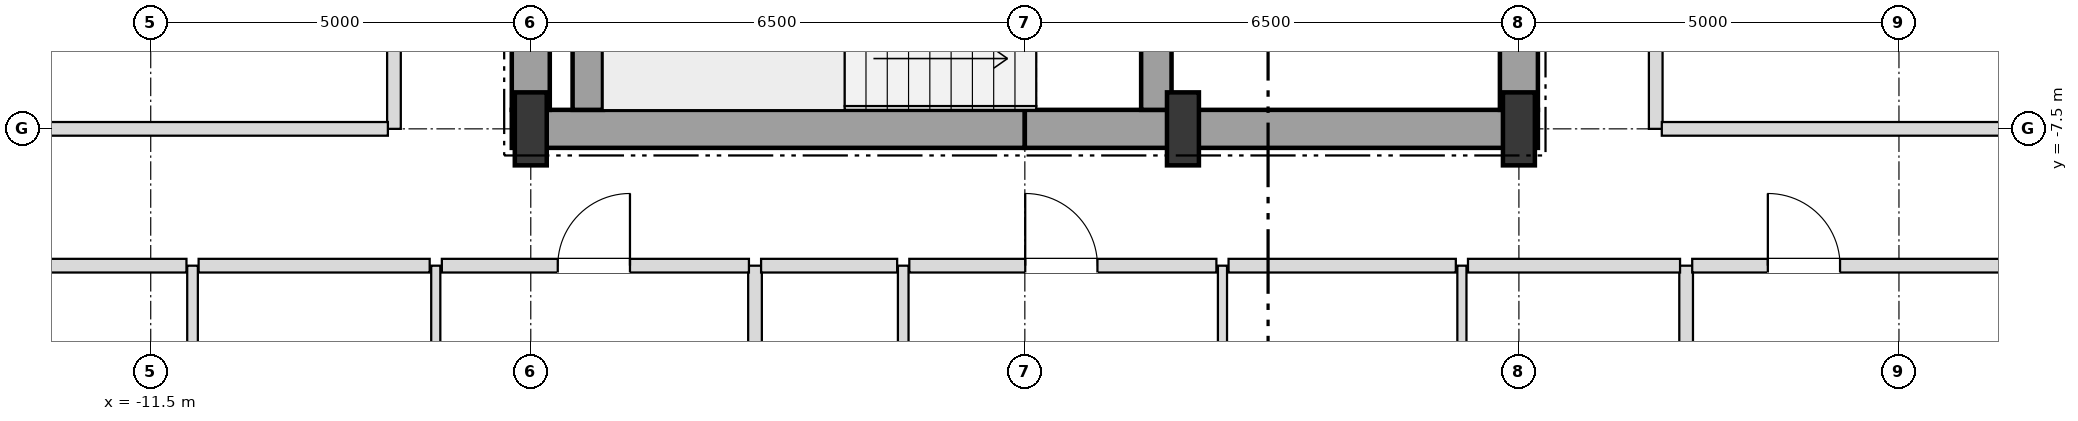
"""IFC4 building model, lengths in metres.
Left out: names, types, materials, properties, quantities, classifications, styles, units other than length and angle.
Written with IfcOpenShell. Run it as: python <this file> out.ifc"""

import sys

from ifc_helpers import new_model, si_unit, direction, frame, frame_2d, origin, origin_2d, place, context, subcontext, project, spatial, rectangle, i_section, extrude, element, fill, save


model = new_model("IFC4")
c1 = context("Model", 3, precision=1e-05, world=origin(), true_north=direction((0.0, 1.0)))
c2 = subcontext(c1, "Body", "Model", "MODEL_VIEW")
j1 = project(units=[si_unit("LENGTHUNIT", "METRE"), si_unit("PLANEANGLEUNIT", "RADIAN")], contexts=[c1])
p1 = place(None, origin())
s1 = spatial("IfcSite", under=j1, at=p1, CompositionType="ELEMENT")
p2 = place(p1, origin())
s2 = spatial("IfcBuilding", under=s1, at=p2, CompositionType="ELEMENT")
p3 = place(p2, frame((0.0, 0.0, 39.6)))
s3 = spatial("IfcBuildingStorey", under=s2, at=p3, CompositionType="ELEMENT", Elevation=39.6)
for number, where, z_axis, x_axis in (
    (1, (-6.5, -7.5, 0.0), (0.0, 0.0, 1.0), (1.0, 0.0, 0.0)),
    (2, (2.08, -7.5, 0.0), (0.0, 0.0, 1.0), (1.0, 0.0, 0.0)),
    (3, (6.5, -7.5, 0.0), (0.0, 0.0, 1.0), (1.0, 0.0, 0.0)),
):
    element("IfcColumn", number, at=place(p3, frame(where, z_axis=z_axis, x_axis=x_axis)), inside=s3, PredefinedType="COLUMN", context=c2, shape_type="SweptSolid", body=[
        extrude(i_section(OverallWidth=0.42, OverallDepth=0.96, WebThickness=0.022, FlangeThickness=0.034, at=origin_2d()), origin(), (0.0, 0.0, 1.0), 3.6),
    ])
for number, where, z_axis, x_axis in (
    (4, (-6.75, -7.5, 0.0), (0.0, 0.0, 1.0), (1.0, 0.0, 0.0)),
    (5, (0.0, -7.5, 0.0), (0.0, 0.0, 1.0), (1.0, 0.0, 0.0)),
):
    element("IfcWall", number, at=place(p3, frame(where, z_axis=z_axis, x_axis=x_axis)), inside=s3, PredefinedType="SHEAR", context=c2, shape_type="SweptSolid", body=[
        extrude(rectangle(XDim=6.75, YDim=0.5, at=frame_2d((3.375, 0.0))), origin(), (0.0, 0.0, 1.0), 3.38),
    ])
p4 = place(p3, frame((-6.5, -7.25, 0.0), z_axis=(0.0, 0.0, 1.0), x_axis=(0.0, 1.0, 0.0)))
e6 = element("IfcWall", 6, at=p4, inside=s3, PredefinedType="SHEAR", context=c2, shape_type="SweptSolid", body=[
    extrude(rectangle(XDim=3.55, YDim=0.5, at=frame_2d((1.775, 0.0))), origin(), (0.0, 0.0, 1.0), 3.38),
])
p5 = place(p3, frame((6.5, -7.25, 0.0), z_axis=(0.0, 0.0, 1.0), x_axis=(0.0, 1.0, 0.0)))
e7 = element("IfcWall", 7, at=p5, inside=s3, PredefinedType="SHEAR", context=c2, shape_type="SweptSolid", body=[
    extrude(rectangle(XDim=5.75, YDim=0.5, at=frame_2d((2.875, 0.0))), origin(), (0.0, 0.0, 1.0), 3.38),
])
p6 = place(p5, frame((0.85, 0.0, 0.0)))
e8 = element("IfcOpeningElement", 8, at=p6, cuts=e7, PredefinedType="OPENING", context=c2, shape_type="SweptSolid", body=[
    extrude(rectangle(XDim=1.05, YDim=2.15, at=frame_2d((0.525, 1.075))), frame((0.0, 0.26, 0.0), z_axis=(0.0, -1.0, 0.0), x_axis=(1.0, 0.0, 0.0)), (0.0, 0.0, 1.0), 0.52),
])
p7 = place(p3, frame((-5.75, -7.25, 0.0), z_axis=(0.0, 0.0, 1.0), x_axis=(0.0, 1.0, 0.0)))
e9 = element("IfcWall", 9, at=p7, inside=s3, PredefinedType="SHEAR", context=c2, shape_type="SweptSolid", body=[
    extrude(rectangle(XDim=2.9, YDim=0.4, at=frame_2d((1.45, 0.0))), origin(), (0.0, 0.0, 1.0), 3.38),
])
p8 = place(p3, frame((1.73, -7.25, 0.0), z_axis=(0.0, 0.0, 1.0), x_axis=(0.0, 1.0, 0.0)))
e10 = element("IfcWall", 10, at=p8, inside=s3, PredefinedType="SHEAR", context=c2, shape_type="SweptSolid", body=[
    extrude(rectangle(XDim=3.3, YDim=0.4, at=frame_2d((1.65, 0.0))), origin(), (0.0, 0.0, 1.0), 3.38),
])
p9 = place(p8, frame((0.9, 0.0, 0.0)))
e11 = element("IfcOpeningElement", 11, at=p9, cuts=e10, PredefinedType="OPENING", context=c2, shape_type="SweptSolid", body=[
    extrude(rectangle(XDim=1.05, YDim=2.15, at=frame_2d((0.525, 1.075))), frame((0.0, 0.21, 0.0), z_axis=(0.0, -1.0, 0.0), x_axis=(1.0, 0.0, 0.0)), (0.0, 0.0, 1.0), 0.42),
])
p10 = place(p3, frame((-10.95, -18.9, 0.0), z_axis=(0.0, 0.0, 1.0), x_axis=(0.0, 1.0, 0.0)))
e12 = element("IfcWall", 12, at=p10, inside=s3, PredefinedType="PARTITIONING", context=c2, shape_type="SweptSolid", body=[
    extrude(rectangle(XDim=9.6, YDim=0.14, at=frame_2d((4.8, 0.0))), origin(), (0.0, 0.0, 1.0), 2.816),
])
p11 = place(p10, frame((4.35, 0.0, 0.0)))
e13 = element("IfcOpeningElement", 13, at=p11, cuts=e12, PredefinedType="OPENING", context=c2, shape_type="SweptSolid", body=[
    extrude(rectangle(XDim=0.9, YDim=2.1, at=frame_2d((0.45, 1.05))), frame((0.0, 0.08, 0.0), z_axis=(0.0, -1.0, 0.0), x_axis=(1.0, 0.0, 0.0)), (0.0, 0.0, 1.0), 0.16),
])
p12 = place(p3, frame((-8.3, -7.5, 0.0), z_axis=(0.0, 0.0, 1.0), x_axis=(0.0, 1.0, 0.0)))
e14 = element("IfcWall", 14, at=p12, inside=s3, PredefinedType="PARTITIONING", context=c2, shape_type="SweptSolid", body=[
    extrude(rectangle(XDim=15.0, YDim=0.18, at=frame_2d((7.5, 0.0))), origin(), (0.0, 0.0, 1.0), 3.38),
])
p13 = place(p12, frame((3.475, 0.0, 0.0)))
e15 = element("IfcOpeningElement", 15, at=p13, cuts=e14, PredefinedType="OPENING", context=c2, shape_type="SweptSolid", body=[
    extrude(rectangle(XDim=0.95, YDim=2.15, at=frame_2d((0.475, 1.075))), frame((0.0, 0.1, 0.0), z_axis=(0.0, -1.0, 0.0), x_axis=(1.0, 0.0, 0.0)), (0.0, 0.0, 1.0), 0.2),
])
p14 = place(p3, frame((-7.75, -18.9, 0.0), z_axis=(0.0, 0.0, 1.0), x_axis=(0.0, 1.0, 0.0)))
e16 = element("IfcWall", 16, at=p14, inside=s3, PredefinedType="PARTITIONING", context=c2, shape_type="SweptSolid", body=[
    extrude(rectangle(XDim=9.6, YDim=0.12, at=frame_2d((4.8, 0.0))), origin(), (0.0, 0.0, 1.0), 2.816),
])
p15 = place(p14, frame((4.325, 0.0, 0.0)))
e17 = element("IfcOpeningElement", 17, at=p15, cuts=e16, PredefinedType="OPENING", context=c2, shape_type="SweptSolid", body=[
    extrude(rectangle(XDim=0.95, YDim=2.1, at=frame_2d((0.475, 1.05))), frame((0.0, 0.07, 0.0), z_axis=(0.0, -1.0, 0.0), x_axis=(1.0, 0.0, 0.0)), (0.0, 0.0, 1.0), 0.14),
])
p16 = place(p3, frame((-3.55, -24.9, 0.0), z_axis=(0.0, 0.0, 1.0), x_axis=(0.0, 1.0, 0.0)))
e18 = element("IfcWall", 18, at=p16, inside=s3, PredefinedType="PARTITIONING", context=c2, shape_type="SweptSolid", body=[
    extrude(rectangle(XDim=15.6, YDim=0.18, at=frame_2d((7.8, 0.0))), origin(), (0.0, 0.0, 1.0), 2.816),
])
p17 = place(p3, frame((-1.6, -18.9, 0.0), z_axis=(0.0, 0.0, 1.0), x_axis=(0.0, 1.0, 0.0)))
e19 = element("IfcWall", 19, at=p17, inside=s3, PredefinedType="PARTITIONING", context=c2, shape_type="SweptSolid", body=[
    extrude(rectangle(XDim=9.6, YDim=0.14, at=frame_2d((4.8, 0.0))), origin(), (0.0, 0.0, 1.0), 2.948),
])
p18 = place(p17, frame((4.35, 0.0, 0.0)))
e20 = element("IfcOpeningElement", 20, at=p18, cuts=e19, PredefinedType="OPENING", context=c2, shape_type="SweptSolid", body=[
    extrude(rectangle(XDim=0.9, YDim=2.1, at=frame_2d((0.45, 1.05))), frame((0.0, 0.08, 0.0), z_axis=(0.0, -1.0, 0.0), x_axis=(1.0, 0.0, 0.0)), (0.0, 0.0, 1.0), 0.16),
])
p19 = place(p3, frame((2.6, -24.9, 0.0), z_axis=(0.0, 0.0, 1.0), x_axis=(0.0, 1.0, 0.0)))
e21 = element("IfcWall", 21, at=p19, inside=s3, PredefinedType="PARTITIONING", context=c2, shape_type="SweptSolid", body=[
    extrude(rectangle(XDim=15.6, YDim=0.12, at=frame_2d((7.8, 0.0))), origin(), (0.0, 0.0, 1.0), 2.816),
])
p20 = place(p19, frame((10.325, 0.0, 0.0)))
e22 = element("IfcOpeningElement", 22, at=p20, cuts=e21, PredefinedType="OPENING", context=c2, shape_type="SweptSolid", body=[
    extrude(rectangle(XDim=0.95, YDim=2.1, at=frame_2d((0.475, 1.05))), frame((0.0, 0.07, 0.0), z_axis=(0.0, -1.0, 0.0), x_axis=(1.0, 0.0, 0.0)), (0.0, 0.0, 1.0), 0.14),
])
p21 = place(p19, frame((2.55, 0.0, 0.0)))
e23 = element("IfcOpeningElement", 23, at=p21, cuts=e21, PredefinedType="OPENING", context=c2, shape_type="SweptSolid", body=[
    extrude(rectangle(XDim=0.9, YDim=2.1, at=frame_2d((0.45, 1.05))), frame((0.0, 0.07, 0.0), z_axis=(0.0, -1.0, 0.0), x_axis=(1.0, 0.0, 0.0)), (0.0, 0.0, 1.0), 0.14),
])
p22 = place(p3, frame((5.75, -24.9, 0.0), z_axis=(0.0, 0.0, 1.0), x_axis=(0.0, 1.0, 0.0)))
e24 = element("IfcWall", 24, at=p22, inside=s3, PredefinedType="PARTITIONING", context=c2, shape_type="SweptSolid", body=[
    extrude(rectangle(XDim=15.6, YDim=0.12, at=frame_2d((7.8, 0.0))), origin(), (0.0, 0.0, 1.0), 2.816),
])
p23 = place(p22, frame((10.35, 0.0, 0.0)))
e25 = element("IfcOpeningElement", 25, at=p23, cuts=e24, PredefinedType="OPENING", context=c2, shape_type="SweptSolid", body=[
    extrude(rectangle(XDim=0.9, YDim=2.1, at=frame_2d((0.45, 1.05))), frame((0.0, 0.07, 0.0), z_axis=(0.0, -1.0, 0.0), x_axis=(1.0, 0.0, 0.0)), (0.0, 0.0, 1.0), 0.14),
])
p24 = place(p22, frame((2.55, 0.0, 0.0)))
e26 = element("IfcOpeningElement", 26, at=p24, cuts=e24, PredefinedType="OPENING", context=c2, shape_type="SweptSolid", body=[
    extrude(rectangle(XDim=0.9, YDim=2.1, at=frame_2d((0.45, 1.05))), frame((0.0, 0.07, 0.0), z_axis=(0.0, -1.0, 0.0), x_axis=(1.0, 0.0, 0.0)), (0.0, 0.0, 1.0), 0.14),
])
p25 = place(p3, frame((8.3, -7.5, 0.0), z_axis=(0.0, 0.0, 1.0), x_axis=(0.0, 1.0, 0.0)))
e27 = element("IfcWall", 27, at=p25, inside=s3, PredefinedType="PARTITIONING", context=c2, shape_type="SweptSolid", body=[
    extrude(rectangle(XDim=15.0, YDim=0.18, at=frame_2d((7.5, 0.0))), origin(), (0.0, 0.0, 1.0), 3.38),
])
p26 = place(p25, frame((3.475, 0.0, 0.0)))
e28 = element("IfcOpeningElement", 28, at=p26, cuts=e27, PredefinedType="OPENING", context=c2, shape_type="SweptSolid", body=[
    extrude(rectangle(XDim=0.95, YDim=2.15, at=frame_2d((0.475, 1.075))), frame((0.0, 0.1, 0.0), z_axis=(0.0, -1.0, 0.0), x_axis=(1.0, 0.0, 0.0)), (0.0, 0.0, 1.0), 0.2),
])
p27 = place(p3, frame((8.7, -24.9, 0.0), z_axis=(0.0, 0.0, 1.0), x_axis=(0.0, 1.0, 0.0)))
e29 = element("IfcWall", 29, at=p27, inside=s3, PredefinedType="PARTITIONING", context=c2, shape_type="SweptSolid", body=[
    extrude(rectangle(XDim=15.6, YDim=0.18, at=frame_2d((7.8, 0.0))), origin(), (0.0, 0.0, 1.0), 2.816),
])
p28 = place(p3, frame((-12.82, -9.3, 0.0), z_axis=(0.0, 0.0, 1.0), x_axis=(1.0, 0.0, 0.0)))
e30 = element("IfcWall", 30, at=p28, inside=s3, PredefinedType="PARTITIONING", context=c2, shape_type="SweptSolid", body=[
    extrude(rectangle(XDim=1.79, YDim=0.18, at=frame_2d((0.895, 0.0))), origin(), (0.0, 0.0, 1.0), 3.38),
])
p29 = place(p3, frame((-10.87, -9.3, 0.0), z_axis=(0.0, 0.0, 1.0), x_axis=(1.0, 0.0, 0.0)))
e31 = element("IfcWall", 31, at=p29, inside=s3, PredefinedType="PARTITIONING", context=c2, shape_type="SweptSolid", body=[
    extrude(rectangle(XDim=3.04, YDim=0.18, at=frame_2d((1.52, 0.0))), origin(), (0.0, 0.0, 1.0), 3.38),
])
p30 = place(p3, frame((-7.67, -9.3, 0.0), z_axis=(0.0, 0.0, 1.0), x_axis=(1.0, 0.0, 0.0)))
e32 = element("IfcWall", 32, at=p30, inside=s3, PredefinedType="PARTITIONING", context=c2, shape_type="SweptSolid", body=[
    extrude(rectangle(XDim=4.04, YDim=0.18, at=frame_2d((2.02, 0.0))), origin(), (0.0, 0.0, 1.0), 2.816),
])
p31 = place(p30, frame((1.525, 0.0, 0.0)))
e33 = element("IfcOpeningElement", 33, at=p31, cuts=e32, PredefinedType="OPENING", context=c2, shape_type="SweptSolid", body=[
    extrude(rectangle(XDim=0.95, YDim=2.15, at=frame_2d((0.475, 1.075))), frame((0.0, 0.1, 0.0), z_axis=(0.0, -1.0, 0.0), x_axis=(1.0, 0.0, 0.0)), (0.0, 0.0, 1.0), 0.2),
])
p32 = place(p3, frame((-3.47, -9.3, 0.0), z_axis=(0.0, 0.0, 1.0), x_axis=(1.0, 0.0, 0.0)))
e34 = element("IfcWall", 34, at=p32, inside=s3, PredefinedType="PARTITIONING", context=c2, shape_type="SweptSolid", body=[
    extrude(rectangle(XDim=1.79, YDim=0.18, at=frame_2d((0.895, 0.0))), origin(), (0.0, 0.0, 1.0), 3.38),
])
p33 = place(p3, frame((-1.52, -9.3, 0.0), z_axis=(0.0, 0.0, 1.0), x_axis=(1.0, 0.0, 0.0)))
e35 = element("IfcWall", 35, at=p33, inside=s3, PredefinedType="PARTITIONING", context=c2, shape_type="SweptSolid", body=[
    extrude(rectangle(XDim=4.04, YDim=0.18, at=frame_2d((2.02, 0.0))), origin(), (0.0, 0.0, 1.0), 3.38),
])
p34 = place(p33, frame((1.525, 0.0, 0.0)))
e36 = element("IfcOpeningElement", 36, at=p34, cuts=e35, PredefinedType="OPENING", context=c2, shape_type="SweptSolid", body=[
    extrude(rectangle(XDim=0.95, YDim=2.15, at=frame_2d((0.475, 1.075))), frame((0.0, 0.1, 0.0), z_axis=(0.0, -1.0, 0.0), x_axis=(1.0, 0.0, 0.0)), (0.0, 0.0, 1.0), 0.2),
])
p35 = place(p3, frame((2.68, -9.3, 0.0), z_axis=(0.0, 0.0, 1.0), x_axis=(1.0, 0.0, 0.0)))
e37 = element("IfcWall", 37, at=p35, inside=s3, PredefinedType="PARTITIONING", context=c2, shape_type="SweptSolid", body=[
    extrude(rectangle(XDim=2.99, YDim=0.18, at=frame_2d((1.495, 0.0))), origin(), (0.0, 0.0, 1.0), 3.38),
])
p36 = place(p3, frame((5.83, -9.3, 0.0), z_axis=(0.0, 0.0, 1.0), x_axis=(1.0, 0.0, 0.0)))
e38 = element("IfcWall", 38, at=p36, inside=s3, PredefinedType="PARTITIONING", context=c2, shape_type="SweptSolid", body=[
    extrude(rectangle(XDim=2.79, YDim=0.18, at=frame_2d((1.395, 0.0))), origin(), (0.0, 0.0, 1.0), 2.816),
])
p37 = place(p3, frame((8.78, -9.3, 0.0), z_axis=(0.0, 0.0, 1.0), x_axis=(1.0, 0.0, 0.0)))
e39 = element("IfcWall", 39, at=p37, inside=s3, PredefinedType="PARTITIONING", context=c2, shape_type="SweptSolid", body=[
    extrude(rectangle(XDim=5.19, YDim=0.18, at=frame_2d((2.595, 0.0))), origin(), (0.0, 0.0, 1.0), 3.38),
])
p38 = place(p37, frame((0.995, 0.0, 0.0)))
e40 = element("IfcOpeningElement", 40, at=p38, cuts=e39, PredefinedType="OPENING", context=c2, shape_type="SweptSolid", body=[
    extrude(rectangle(XDim=0.95, YDim=2.15, at=frame_2d((0.475, 1.075))), frame((0.0, 0.1, 0.0), z_axis=(0.0, -1.0, 0.0), x_axis=(1.0, 0.0, 0.0)), (0.0, 0.0, 1.0), 0.2),
])
for number, where, z_axis, x_axis in (
    (41, (-16.02, -7.5, 0.0), (0.0, 0.0, 1.0), (1.0, 0.0, 0.0)),
    (42, (8.38, -7.5, 0.0), (0.0, 0.0, 1.0), (1.0, 0.0, 0.0)),
):
    element("IfcWall", number, at=place(p3, frame(where, z_axis=z_axis, x_axis=x_axis)), inside=s3, PredefinedType="PARTITIONING", context=c2, shape_type="SweptSolid", body=[
        extrude(rectangle(XDim=7.64, YDim=0.18, at=frame_2d((3.82, 0.0))), origin(), (0.0, 0.0, 1.0), 2.816),
    ])
p39 = place(p31, origin())
e43 = element("IfcDoor", 43, at=p39, inside=s3, OperationType="SINGLE_SWING_RIGHT", PredefinedType="DOOR", context=c2, shape_type="SweptSolid", body=[
    extrude(rectangle(XDim=0.95, YDim=2.15, at=frame_2d((0.475, 1.075))), frame((0.0, 0.025, 0.0), z_axis=(0.0, -1.0, 0.0), x_axis=(1.0, 0.0, 0.0)), (0.0, 0.0, 1.0), 0.05),
])
fill(e33, e43)
p40 = place(p34, origin())
e44 = element("IfcDoor", 44, at=p40, inside=s3, OperationType="SINGLE_SWING_LEFT", PredefinedType="DOOR", context=c2, shape_type="SweptSolid", body=[
    extrude(rectangle(XDim=0.95, YDim=2.15, at=frame_2d((0.475, 1.075))), frame((0.0, 0.025, 0.0), z_axis=(0.0, -1.0, 0.0), x_axis=(1.0, 0.0, 0.0)), (0.0, 0.0, 1.0), 0.05),
])
fill(e36, e44)
p41 = place(p38, origin())
e45 = element("IfcDoor", 45, at=p41, inside=s3, OperationType="SINGLE_SWING_LEFT", PredefinedType="DOOR", context=c2, shape_type="SweptSolid", body=[
    extrude(rectangle(XDim=0.95, YDim=2.15, at=frame_2d((0.475, 1.075))), frame((0.0, 0.025, 0.0), z_axis=(0.0, -1.0, 0.0), x_axis=(1.0, 0.0, 0.0)), (0.0, 0.0, 1.0), 0.05),
])
fill(e40, e45)
save(model, sys.argv[1])
